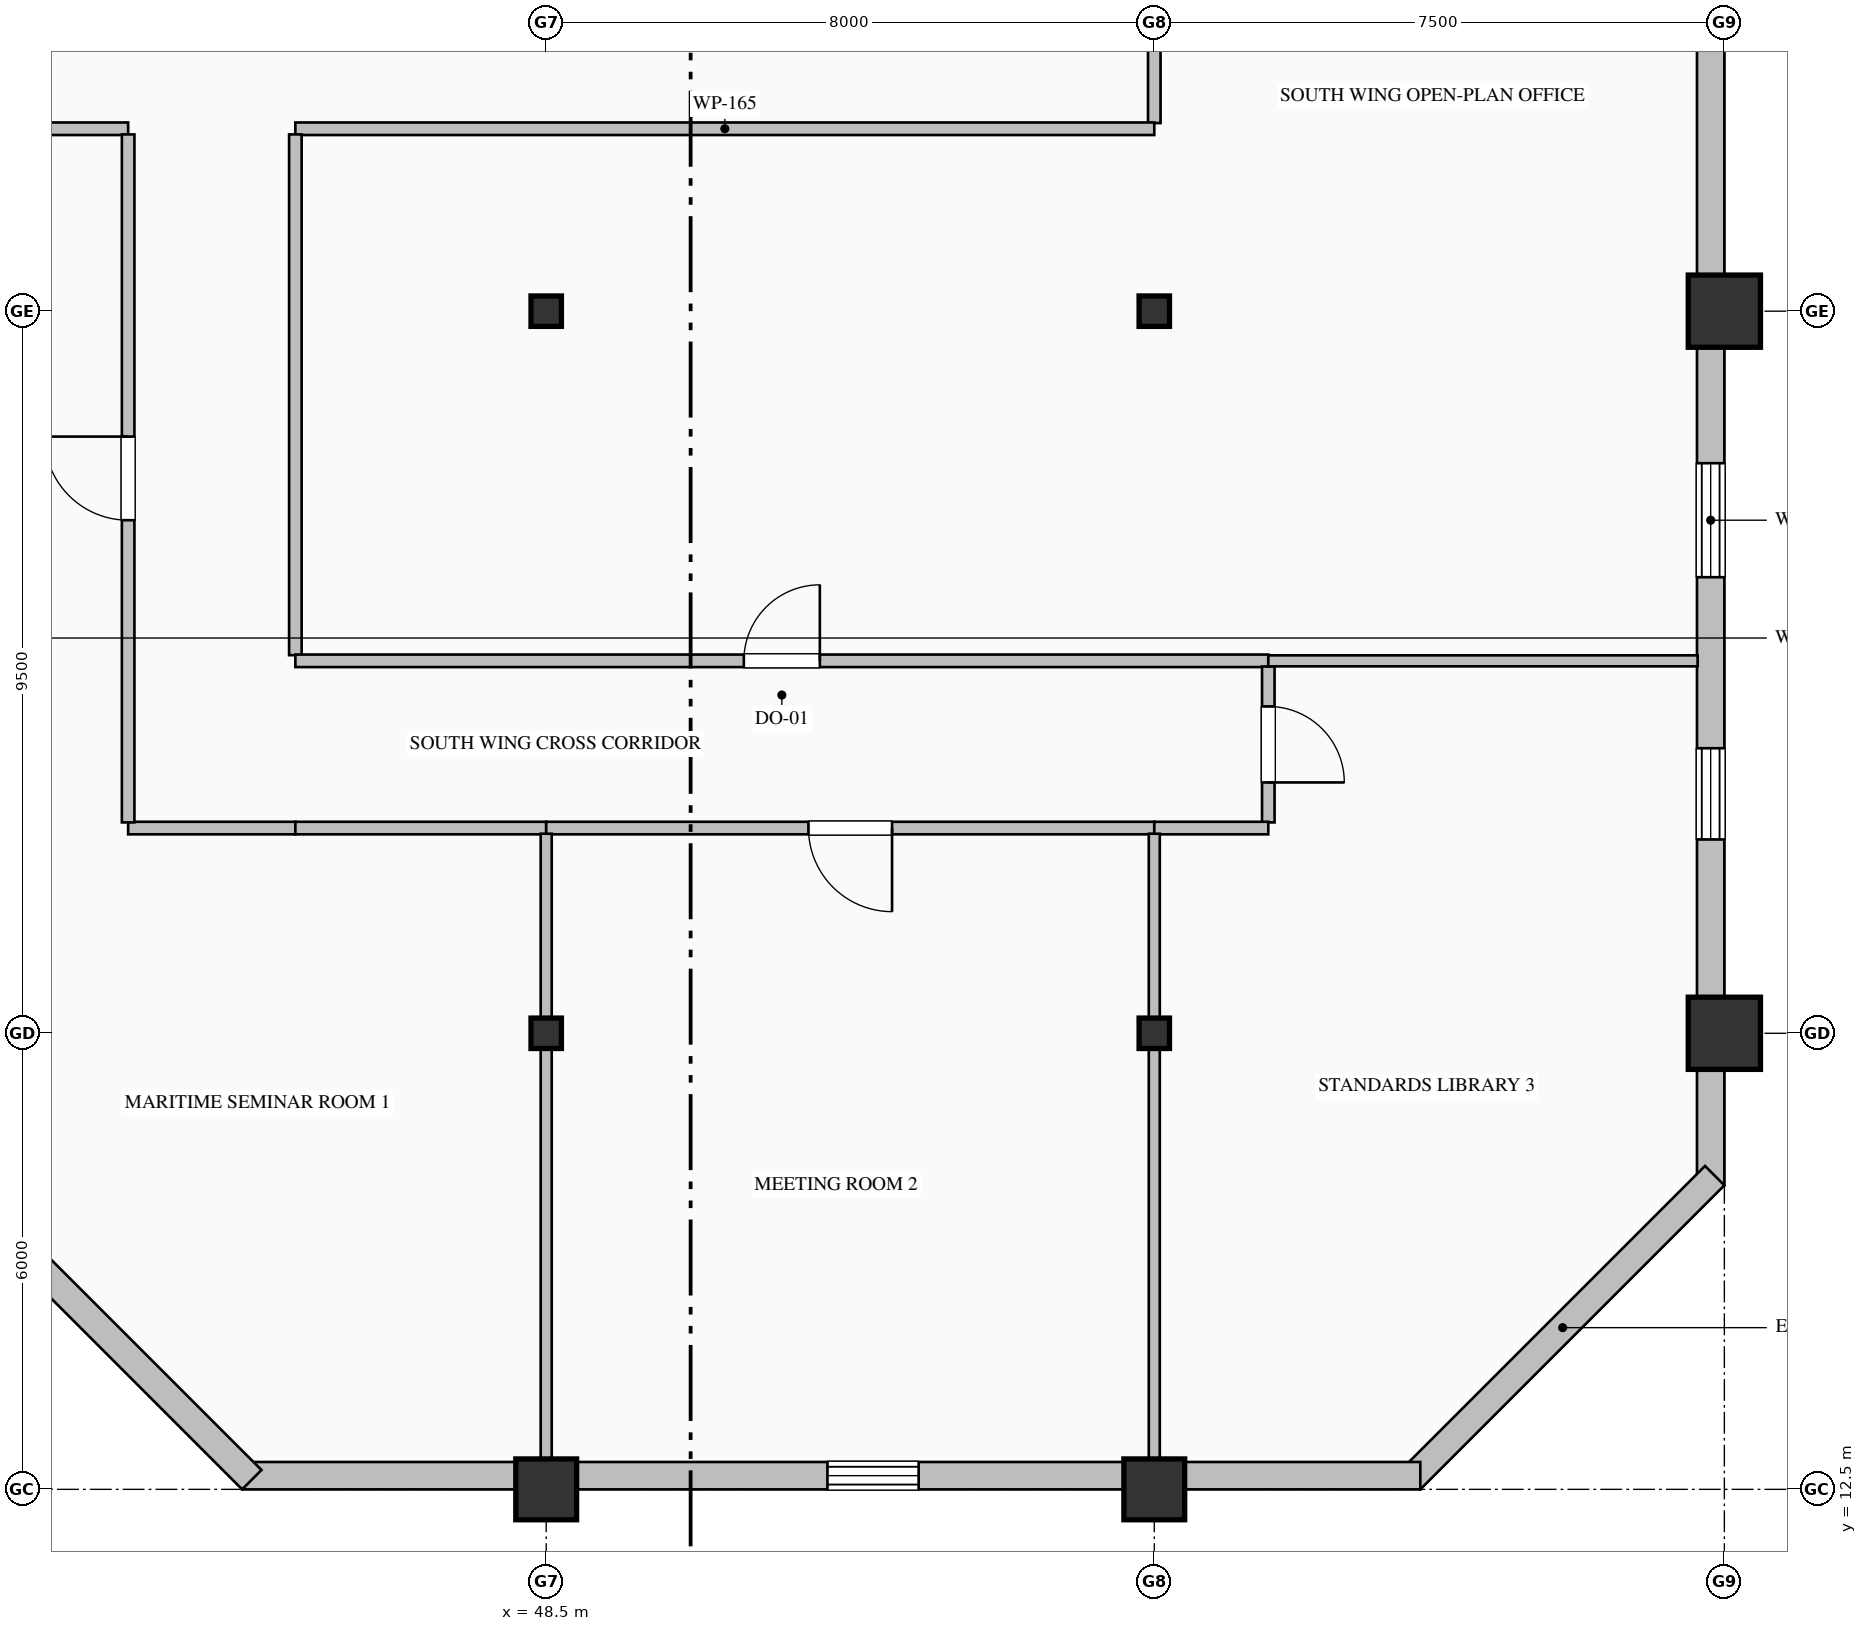
"""IFC4 building model, lengths in metres.
Left out: names, types, materials, properties, quantities, classifications, styles, units other than length and angle.
Written with IfcOpenShell. Run it as: python <this file> out.ifc"""

import sys

from ifc_helpers import new_model, si_unit, direction, frame, frame_2d, origin, origin_2d, place, context, subcontext, project, spatial, rectangle, hollow_rectangle, i_section, extrude, element, fill, save


model = new_model("IFC4")
c1 = context("Model", 3, precision=1e-05, world=origin(), true_north=direction((0.0, 1.0)))
c2 = subcontext(c1, "Body", "Model", "MODEL_VIEW")
j1 = project(units=[si_unit("LENGTHUNIT", "METRE"), si_unit("PLANEANGLEUNIT", "RADIAN")], contexts=[c1])
p1 = place(None, origin())
s1 = spatial("IfcSite", under=j1, at=p1, CompositionType="ELEMENT")
p2 = place(p1, origin())
s2 = spatial("IfcBuilding", under=s1, at=p2, CompositionType="ELEMENT")
p3 = place(p2, frame((0.0, 0.0, 225.8)))
s3 = spatial("IfcBuildingStorey", under=s2, at=p3, CompositionType="ELEMENT", Elevation=225.8)
p4 = place(p3, frame((48.5, 12.5, 0.0), z_axis=(0.0, 0.0, 1.0), x_axis=(1.0, 0.0, 0.0)))
e1 = element("IfcColumn", 1, at=p4, inside=s3, PredefinedType="COLUMN", context=c2, shape_type="SweptSolid", body=[
    extrude(hollow_rectangle(XDim=0.8, YDim=0.8, WallThickness=0.032, at=origin_2d()), origin(), (0.0, 0.0, 1.0), 4.0),
])
for number, where, z_axis, x_axis in (
    (2, (48.5, 18.5, 0.0), (0.0, 0.0, 1.0), (1.0, 0.0, 0.0)),
    (3, (48.5, 28.0, 0.0), (0.0, 0.0, 1.0), (1.0, 0.0, 0.0)),
):
    element("IfcColumn", number, at=place(p3, frame(where, z_axis=z_axis, x_axis=x_axis)), inside=s3, PredefinedType="COLUMN", context=c2, shape_type="SweptSolid", body=[
        extrude(i_section(OverallWidth=0.4, OverallDepth=0.4, WebThickness=0.013, FlangeThickness=0.021, FilletRadius=0.022, at=origin_2d()), origin(), (0.0, 0.0, 1.0), 4.0),
    ])
p5 = place(p3, frame((56.5, 12.5, 0.0), z_axis=(0.0, 0.0, 1.0), x_axis=(1.0, 0.0, 0.0)))
e4 = element("IfcColumn", 4, at=p5, inside=s3, PredefinedType="COLUMN", context=c2, shape_type="SweptSolid", body=[
    extrude(hollow_rectangle(XDim=0.8, YDim=0.8, WallThickness=0.032, at=origin_2d()), origin(), (0.0, 0.0, 1.0), 4.0),
])
for number, where, z_axis, x_axis in (
    (5, (56.5, 18.5, 0.0), (0.0, 0.0, 1.0), (1.0, 0.0, 0.0)),
    (6, (56.5, 28.0, 0.0), (0.0, 0.0, 1.0), (1.0, 0.0, 0.0)),
):
    element("IfcColumn", number, at=place(p3, frame(where, z_axis=z_axis, x_axis=x_axis)), inside=s3, PredefinedType="COLUMN", context=c2, shape_type="SweptSolid", body=[
        extrude(i_section(OverallWidth=0.4, OverallDepth=0.4, WebThickness=0.013, FlangeThickness=0.021, FilletRadius=0.022, at=origin_2d()), origin(), (0.0, 0.0, 1.0), 4.0),
    ])
for number, where, z_axis, x_axis in (
    (7, (64.0, 18.5, 0.0), (0.0, 0.0, 1.0), (1.0, 0.0, 0.0)),
    (8, (64.0, 28.0, 0.0), (0.0, 0.0, 1.0), (1.0, 0.0, 0.0)),
):
    element("IfcColumn", number, at=place(p3, frame(where, z_axis=z_axis, x_axis=x_axis)), inside=s3, PredefinedType="COLUMN", context=c2, shape_type="SweptSolid", body=[
        extrude(hollow_rectangle(XDim=0.95, YDim=0.95, WallThickness=0.036, at=origin_2d()), origin(), (0.0, 0.0, 1.0), 4.0),
    ])
p6 = place(p3, frame((63.82, 36.05, 0.0), z_axis=(0.0, 0.0, 1.0), x_axis=(0.0, -1.0, 0.0)))
e9 = element("IfcWall", 9, at=p6, inside=s3, PredefinedType="SOLIDWALL", context=c2, shape_type="SweptSolid", body=[
    extrude(rectangle(XDim=19.55, YDim=0.36, at=frame_2d((9.775, 0.0))), origin(), (0.0, 0.0, 1.0), 3.325),
])
p7 = place(p6, frame((3.0, 0.0, 0.9)))
e10 = element("IfcOpeningElement", 10, at=p7, cuts=e9, PredefinedType="OPENING", context=c2, shape_type="SweptSolid", body=[
    extrude(rectangle(XDim=1.2, YDim=1.85, at=frame_2d((0.6, 0.925))), frame((0.0, 0.19, 0.0), z_axis=(0.0, -1.0, 0.0), x_axis=(1.0, 0.0, 0.0)), (0.0, 0.0, 1.0), 0.38),
])
p8 = place(p6, frame((10.05, 0.0, 0.7)))
e11 = element("IfcOpeningElement", 11, at=p8, cuts=e9, PredefinedType="OPENING", context=c2, shape_type="SweptSolid", body=[
    extrude(rectangle(XDim=1.5, YDim=2.4, at=frame_2d((0.75, 1.2))), frame((0.0, 0.19, 0.0), z_axis=(0.0, -1.0, 0.0), x_axis=(1.0, 0.0, 0.0)), (0.0, 0.0, 1.0), 0.38),
])
p9 = place(p6, frame((13.8, 0.0, 0.9)))
e12 = element("IfcOpeningElement", 12, at=p9, cuts=e9, PredefinedType="OPENING", context=c2, shape_type="SweptSolid", body=[
    extrude(rectangle(XDim=1.2, YDim=1.85, at=frame_2d((0.6, 0.925))), frame((0.0, 0.19, 0.0), z_axis=(0.0, -1.0, 0.0), x_axis=(1.0, 0.0, 0.0)), (0.0, 0.0, 1.0), 0.38),
])
p10 = place(p3, frame((63.873, 16.627, 0.0), z_axis=(0.0, 0.0, 1.0), x_axis=(-0.707106781187, -0.707106781187, 0.0)))
e13 = element("IfcWall", 13, at=p10, inside=s3, PredefinedType="SOLIDWALL", context=c2, shape_type="SweptSolid", body=[
    extrude(rectangle(XDim=5.657, YDim=0.36, at=frame_2d((2.828, 0.0))), origin(), (0.0, 0.0, 1.0), 3.775),
])
p11 = place(p3, frame((60.0, 12.68, 0.0), z_axis=(0.0, 0.0, 1.0), x_axis=(-1.0, 0.0, 0.0)))
e14 = element("IfcWall", 14, at=p11, inside=s3, PredefinedType="SOLIDWALL", context=c2, shape_type="SweptSolid", body=[
    extrude(rectangle(XDim=15.5, YDim=0.36, at=frame_2d((7.75, 0.0))), origin(), (0.0, 0.0, 1.0), 3.325),
])
p12 = place(p11, frame((6.6, 0.0, 0.9)))
e15 = element("IfcOpeningElement", 15, at=p12, cuts=e14, PredefinedType="OPENING", context=c2, shape_type="SweptSolid", body=[
    extrude(rectangle(XDim=1.2, YDim=1.85, at=frame_2d((0.6, 0.925))), frame((0.0, 0.19, 0.0), z_axis=(0.0, -1.0, 0.0), x_axis=(1.0, 0.0, 0.0)), (0.0, 0.0, 1.0), 0.38),
])
p13 = place(p3, frame((44.627, 12.627, 0.0), z_axis=(0.0, 0.0, 1.0), x_axis=(-0.707106781187, 0.707106781187, 0.0)))
e16 = element("IfcWall", 16, at=p13, inside=s3, PredefinedType="SOLIDWALL", context=c2, shape_type="SweptSolid", body=[
    extrude(rectangle(XDim=5.657, YDim=0.36, at=frame_2d((2.828, 0.0))), origin(), (0.0, 0.0, 1.0), 3.775),
])
p14 = place(p3, frame((56.5, 36.0, 0.0), z_axis=(0.0, 0.0, 1.0), x_axis=(0.0, -1.0, 0.0)))
e17 = element("IfcWall", 17, at=p14, inside=s3, PredefinedType="PARTITIONING", context=c2, shape_type="SweptSolid", body=[
    extrude(rectangle(XDim=5.525, YDim=0.165, at=frame_2d((2.763, 0.0))), origin(), (0.0, 0.0, 1.0), 3.179),
])
p15 = place(p3, frame((56.5, 30.4, 0.0), z_axis=(0.0, 0.0, 1.0), x_axis=(-1.0, 0.0, 0.0)))
e18 = element("IfcWall", 18, at=p15, inside=s3, PredefinedType="PARTITIONING", context=c2, shape_type="SweptSolid", body=[
    extrude(rectangle(XDim=11.3, YDim=0.165, at=frame_2d((5.65, 0.0))), origin(), (0.0, 0.0, 1.0), 3.775),
])
p16 = place(p3, frame((43.0, 30.4, 0.0), z_axis=(0.0, 0.0, 1.0), x_axis=(-1.0, 0.0, 0.0)))
e19 = element("IfcWall", 19, at=p16, inside=s3, PredefinedType="PARTITIONING", context=c2, shape_type="SweptSolid", body=[
    extrude(rectangle(XDim=2.5, YDim=0.165, at=frame_2d((1.25, 0.0))), origin(), (0.0, 0.0, 1.0), 3.775),
])
p17 = place(p3, frame((45.2, 30.325, 0.0), z_axis=(0.0, 0.0, 1.0), x_axis=(0.0, -1.0, 0.0)))
e20 = element("IfcWall", 20, at=p17, inside=s3, PredefinedType="PARTITIONING", context=c2, shape_type="SweptSolid", body=[
    extrude(rectangle(XDim=6.851, YDim=0.165, at=frame_2d((3.425, 0.0))), origin(), (0.0, 0.0, 1.0), 3.775),
])
p18 = place(p3, frame((45.2, 21.2, 0.0), z_axis=(0.0, 0.0, 1.0), x_axis=(-1.0, 0.0, 0.0)))
e21 = element("IfcWall", 21, at=p18, inside=s3, PredefinedType="PARTITIONING", context=c2, shape_type="SweptSolid", body=[
    extrude(rectangle(XDim=2.2, YDim=0.165, at=frame_2d((1.1, 0.0))), origin(), (0.0, 0.0, 1.0), 3.775),
])
p19 = place(p3, frame((43.0, 21.274, 0.0), z_axis=(0.0, 0.0, 1.0), x_axis=(0.0, 1.0, 0.0)))
e22 = element("IfcWall", 22, at=p19, inside=s3, PredefinedType="PARTITIONING", context=c2, shape_type="SweptSolid", body=[
    extrude(rectangle(XDim=9.051, YDim=0.165, at=frame_2d((4.525, 0.0))), origin(), (0.0, 0.0, 1.0), 3.775),
])
p20 = place(p19, frame((3.976, 0.0, 0.0)))
e23 = element("IfcOpeningElement", 23, at=p20, cuts=e22, PredefinedType="OPENING", context=c2, shape_type="SweptSolid", body=[
    extrude(rectangle(XDim=1.1, YDim=2.2, at=frame_2d((0.55, 1.1))), frame((0.0, 0.093, 0.0), z_axis=(0.0, -1.0, 0.0), x_axis=(1.0, 0.0, 0.0)), (0.0, 0.0, 1.0), 0.185),
])
p21 = place(p3, frame((45.2, 23.4, 0.0), z_axis=(0.0, 0.0, 1.0), x_axis=(1.0, 0.0, 0.0)))
e24 = element("IfcWall", 24, at=p21, inside=s3, PredefinedType="PARTITIONING", context=c2, shape_type="SweptSolid", body=[
    extrude(rectangle(XDim=12.8, YDim=0.165, at=frame_2d((6.4, 0.0))), origin(), (0.0, 0.0, 1.0), 3.467),
])
p22 = place(p21, frame((5.9, 0.0, 0.0)))
e25 = element("IfcOpeningElement", 25, at=p22, cuts=e24, PredefinedType="OPENING", context=c2, shape_type="SweptSolid", body=[
    extrude(rectangle(XDim=1.0, YDim=2.15, at=frame_2d((0.5, 1.075))), frame((0.0, 0.093, 0.0), z_axis=(0.0, -1.0, 0.0), x_axis=(1.0, 0.0, 0.0)), (0.0, 0.0, 1.0), 0.185),
])
p23 = place(p3, frame((48.5, 21.2, 0.0), z_axis=(0.0, 0.0, 1.0), x_axis=(-1.0, 0.0, 0.0)))
e26 = element("IfcWall", 26, at=p23, inside=s3, PredefinedType="PARTITIONING", context=c2, shape_type="SweptSolid", body=[
    extrude(rectangle(XDim=3.3, YDim=0.165, at=frame_2d((1.65, 0.0))), origin(), (0.0, 0.0, 1.0), 3.775),
])
p24 = place(p3, frame((56.5, 21.2, 0.0), z_axis=(0.0, 0.0, 1.0), x_axis=(-1.0, 0.0, 0.0)))
e27 = element("IfcWall", 27, at=p24, inside=s3, PredefinedType="PARTITIONING", context=c2, shape_type="SweptSolid", body=[
    extrude(rectangle(XDim=8.0, YDim=0.165, at=frame_2d((4.0, 0.0))), origin(), (0.0, 0.0, 1.0), 3.775),
])
p25 = place(p24, frame((3.45, 0.0, 0.0)))
e28 = element("IfcOpeningElement", 28, at=p25, cuts=e27, PredefinedType="OPENING", context=c2, shape_type="SweptSolid", body=[
    extrude(rectangle(XDim=1.1, YDim=2.2, at=frame_2d((0.55, 1.1))), frame((0.0, 0.093, 0.0), z_axis=(0.0, -1.0, 0.0), x_axis=(1.0, 0.0, 0.0)), (0.0, 0.0, 1.0), 0.185),
])
p26 = place(p3, frame((58.0, 23.325, 0.0), z_axis=(0.0, 0.0, 1.0), x_axis=(0.0, -1.0, 0.0)))
e29 = element("IfcWall", 29, at=p26, inside=s3, PredefinedType="PARTITIONING", context=c2, shape_type="SweptSolid", body=[
    extrude(rectangle(XDim=2.051, YDim=0.165, at=frame_2d((1.025, 0.0))), origin(), (0.0, 0.0, 1.0), 3.775),
])
p27 = place(p26, frame((0.525, 0.0, 0.0)))
e30 = element("IfcOpeningElement", 30, at=p27, cuts=e29, PredefinedType="OPENING", context=c2, shape_type="SweptSolid", body=[
    extrude(rectangle(XDim=1.0, YDim=2.15, at=frame_2d((0.5, 1.075))), frame((0.0, 0.093, 0.0), z_axis=(0.0, -1.0, 0.0), x_axis=(1.0, 0.0, 0.0)), (0.0, 0.0, 1.0), 0.185),
])
p28 = place(p3, frame((58.0, 21.2, 0.0), z_axis=(0.0, 0.0, 1.0), x_axis=(-1.0, 0.0, 0.0)))
e31 = element("IfcWall", 31, at=p28, inside=s3, PredefinedType="PARTITIONING", context=c2, shape_type="SweptSolid", body=[
    extrude(rectangle(XDim=1.5, YDim=0.165, at=frame_2d((0.75, 0.0))), origin(), (0.0, 0.0, 1.0), 3.775),
])
p29 = place(p3, frame((63.648, 23.4, 0.0), z_axis=(0.0, 0.0, 1.0), x_axis=(-1.0, 0.0, 0.0)))
e32 = element("IfcWall", 32, at=p29, inside=s3, PredefinedType="PARTITIONING", context=c2, shape_type="SweptSolid", body=[
    extrude(rectangle(XDim=5.648, YDim=0.145, at=frame_2d((2.824, 0.0))), origin(), (0.0, 0.0, 1.0), 3.775),
])
for number, where, z_axis, x_axis in (
    (33, (48.5, 21.125, 0.0), (0.0, 0.0, 1.0), (0.0, -1.0, 0.0)),
    (34, (56.5, 21.125, 0.0), (0.0, 0.0, 1.0), (0.0, -1.0, 0.0)),
):
    element("IfcWall", number, at=place(p3, frame(where, z_axis=z_axis, x_axis=x_axis)), inside=s3, PredefinedType="PARTITIONING", context=c2, shape_type="SweptSolid", body=[
        extrude(rectangle(XDim=8.273, YDim=0.145, at=frame_2d((4.137, 0.0))), origin(), (0.0, 0.0, 1.0), 2.967),
    ])
p30 = place(p8, origin())
e35 = element("IfcWindow", 35, at=p30, inside=s3, PartitioningType="DOUBLE_PANEL_HORIZONTAL", PredefinedType="WINDOW", context=c2, shape_type="SweptSolid", body=[
    extrude(rectangle(XDim=1.5, YDim=2.4, at=frame_2d((0.75, 1.2))), frame((0.0, 0.15, 0.0), z_axis=(0.0, -1.0, 0.0), x_axis=(1.0, 0.0, 0.0)), (0.0, 0.0, 1.0), 0.06),
])
fill(e11, e35)
p31 = place(p9, origin())
e36 = element("IfcWindow", 36, at=p31, inside=s3, PartitioningType="DOUBLE_PANEL_VERTICAL", PredefinedType="WINDOW", context=c2, shape_type="SweptSolid", body=[
    extrude(rectangle(XDim=1.2, YDim=1.85, at=frame_2d((0.6, 0.925))), frame((0.0, 0.15, 0.0), z_axis=(0.0, -1.0, 0.0), x_axis=(1.0, 0.0, 0.0)), (0.0, 0.0, 1.0), 0.06),
])
fill(e12, e36)
p32 = place(p12, origin())
e37 = element("IfcWindow", 37, at=p32, inside=s3, PartitioningType="DOUBLE_PANEL_VERTICAL", PredefinedType="WINDOW", context=c2, shape_type="SweptSolid", body=[
    extrude(rectangle(XDim=1.2, YDim=1.85, at=frame_2d((0.6, 0.925))), frame((0.0, 0.15, 0.0), z_axis=(0.0, -1.0, 0.0), x_axis=(1.0, 0.0, 0.0)), (0.0, 0.0, 1.0), 0.06),
])
fill(e15, e37)
p33 = place(p22, origin())
e38 = element("IfcDoor", 38, at=p33, inside=s3, OperationType="SINGLE_SWING_RIGHT", PredefinedType="DOOR", context=c2, shape_type="SweptSolid", body=[
    extrude(rectangle(XDim=1.0, YDim=2.15, at=frame_2d((0.5, 1.075))), frame((0.0, 0.025, 0.0), z_axis=(0.0, -1.0, 0.0), x_axis=(1.0, 0.0, 0.0)), (0.0, 0.0, 1.0), 0.05),
])
fill(e25, e38)
p34 = place(p20, origin())
e39 = element("IfcDoor", 39, at=p34, inside=s3, OperationType="SINGLE_SWING_RIGHT", PredefinedType="DOOR", context=c2, shape_type="SweptSolid", body=[
    extrude(rectangle(XDim=1.1, YDim=2.2, at=frame_2d((0.55, 1.1))), frame((0.0, 0.025, 0.0), z_axis=(0.0, -1.0, 0.0), x_axis=(1.0, 0.0, 0.0)), (0.0, 0.0, 1.0), 0.05),
])
fill(e23, e39)
p35 = place(p25, origin())
e40 = element("IfcDoor", 40, at=p35, inside=s3, OperationType="SINGLE_SWING_LEFT", PredefinedType="DOOR", context=c2, shape_type="SweptSolid", body=[
    extrude(rectangle(XDim=1.1, YDim=2.2, at=frame_2d((0.55, 1.1))), frame((0.0, 0.025, 0.0), z_axis=(0.0, -1.0, 0.0), x_axis=(1.0, 0.0, 0.0)), (0.0, 0.0, 1.0), 0.05),
])
fill(e28, e40)
p36 = place(p27, origin())
e41 = element("IfcDoor", 41, at=p36, inside=s3, OperationType="SINGLE_SWING_RIGHT", PredefinedType="DOOR", context=c2, shape_type="SweptSolid", body=[
    extrude(rectangle(XDim=1.0, YDim=2.15, at=frame_2d((0.5, 1.075))), frame((0.0, 0.025, 0.0), z_axis=(0.0, -1.0, 0.0), x_axis=(1.0, 0.0, 0.0)), (0.0, 0.0, 1.0), 0.05),
])
fill(e30, e41)
save(model, sys.argv[1])
